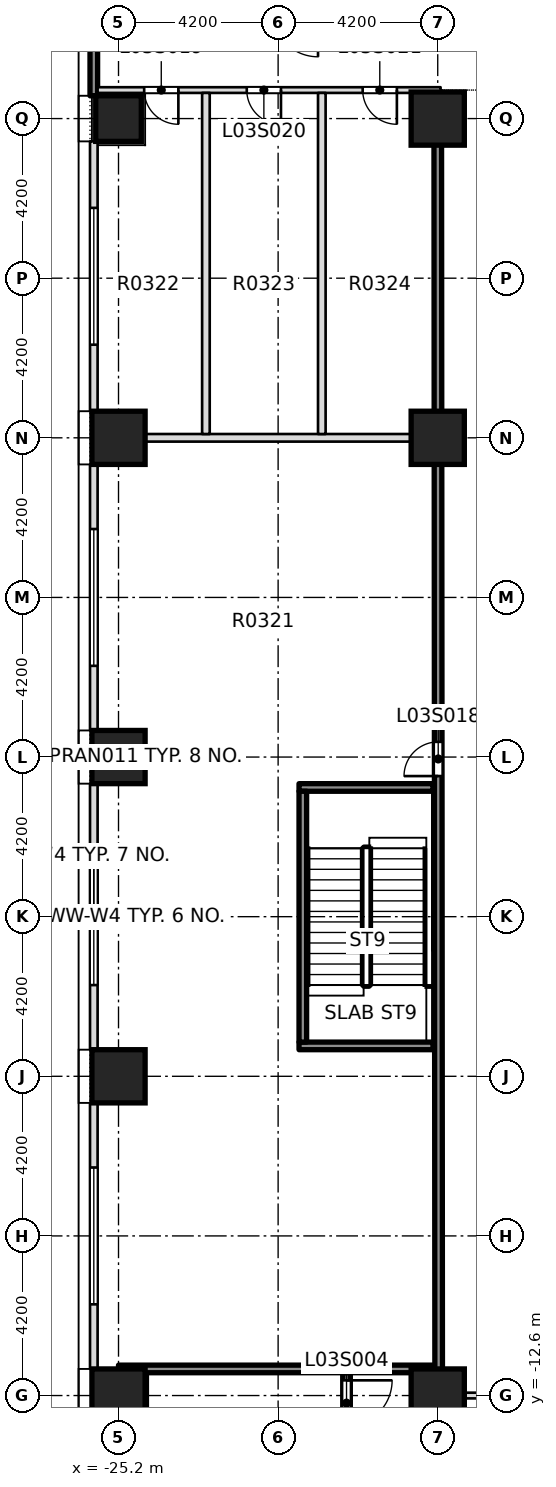
"""IFC4 building model, lengths in metres.
Left out: names, types, materials, properties, quantities, classifications, styles, units other than length and angle.
Written with IfcOpenShell. Run it as: python <this file> out.ifc"""

import sys

from ifc_helpers import new_model, si_unit, direction, frame, frame_2d, origin, origin_2d, place, context, subcontext, project, spatial, rectangle, extrude, element, fill, save


model = new_model("IFC4")
c1 = context("Model", 3, precision=1e-05, world=origin(), true_north=direction((0.0, 1.0)))
c2 = subcontext(c1, "Body", "Model", "MODEL_VIEW")
j1 = project(units=[si_unit("LENGTHUNIT", "METRE"), si_unit("PLANEANGLEUNIT", "RADIAN")], contexts=[c1])
p1 = place(None, origin())
s1 = spatial("IfcSite", under=j1, at=p1, CompositionType="ELEMENT")
p2 = place(p1, origin())
s2 = spatial("IfcBuilding", under=s1, at=p2, CompositionType="ELEMENT")
p3 = place(p2, frame((0.0, 0.0, 20.0)))
s3 = spatial("IfcBuildingStorey", under=s2, at=p3, CompositionType="ELEMENT", Elevation=20.0)
for number, where, z_axis, x_axis in (
    (1, (-25.2, -12.6, -0.4), (0.0, 0.0, 1.0), (1.0, 0.0, 0.0)),
    (2, (-16.8, -12.6, -0.4), (0.0, 0.0, 1.0), (1.0, 0.0, 0.0)),
    (3, (-25.2, -4.2, -0.4), (0.0, 0.0, 1.0), (1.0, 0.0, 0.0)),
    (4, (-25.2, 4.2, -0.4), (0.0, 0.0, 1.0), (1.0, 0.0, 0.0)),
    (5, (-25.2, 12.6, -0.4), (0.0, 0.0, 1.0), (1.0, 0.0, 0.0)),
    (6, (-16.8, 12.6, -0.4), (0.0, 0.0, 1.0), (1.0, 0.0, 0.0)),
    (7, (-16.8, 21.0, -0.4), (0.0, 0.0, 1.0), (1.0, 0.0, 0.0)),
):
    element("IfcColumn", number, at=place(p3, frame(where, z_axis=z_axis, x_axis=x_axis)), inside=s3, PredefinedType="COLUMN", context=c2, shape_type="SweptSolid", body=[
        extrude(rectangle(XDim=1.4, YDim=1.4, at=origin_2d()), origin(), (0.0, 0.0, 1.0), 5.0),
    ])
p4 = place(p3, frame((-25.2, 21.0, 0.0), z_axis=(0.0, 0.0, 1.0), x_axis=(1.0, 0.0, 0.0)))
e8 = element("IfcColumn", 8, at=p4, inside=s3, PredefinedType="COLUMN", context=c2, shape_type="SweptSolid", body=[
    extrude(rectangle(XDim=1.2, YDim=1.2, at=origin_2d()), origin(), (0.0, 0.0, 1.0), 5.0),
])
p5 = place(p3, frame((-16.9, -12.6, 0.0), z_axis=(0.0, 0.0, 1.0), x_axis=(1.0, 0.0, 0.0)))
e9 = element("IfcWall", 9, at=p5, inside=s3, PredefinedType="PARTITIONING", context=c2, shape_type="SweptSolid", body=[
    extrude(rectangle(XDim=9.625, YDim=0.15, at=frame_2d((4.812, 0.0))), origin(), (0.0, 0.0, 1.0), 4.6),
])
p6 = place(p3, frame((-25.2, -11.9, 0.0), z_axis=(0.0, 0.0, 1.0), x_axis=(1.0, 0.0, 0.0)))
e10 = element("IfcWall", 10, at=p6, inside=s3, PredefinedType="SOLIDWALL", context=c2, shape_type="SweptSolid", body=[
    extrude(rectangle(XDim=8.325, YDim=0.2, at=frame_2d((4.163, 0.0))), origin(), (0.0, 0.0, 1.0), 4.6),
])
p7 = place(p3, frame((-25.75, 12.6, 0.0), z_axis=(0.0, 0.0, 1.0), x_axis=(1.0, 0.0, 0.0)))
e11 = element("IfcWall", 11, at=p7, inside=s3, PredefinedType="PARTITIONING", context=c2, shape_type="SweptSolid", body=[
    extrude(rectangle(XDim=8.875, YDim=0.2, at=frame_2d((4.438, 0.0))), origin(), (0.0, 0.0, 1.0), 4.6),
])
p8 = place(p3, frame((-25.75, 21.75, 0.0), z_axis=(0.0, 0.0, 1.0), x_axis=(1.0, 0.0, 0.0)))
e12 = element("IfcWall", 12, at=p8, inside=s3, PredefinedType="PARTITIONING", context=c2, shape_type="SweptSolid", body=[
    extrude(rectangle(XDim=9.025, YDim=0.15, at=frame_2d((4.512, 0.0))), origin(), (0.0, 0.0, 1.0), 4.6),
])
p9 = place(p8, frame((1.225, 0.0, 0.0)))
e13 = element("IfcOpeningElement", 13, at=p9, cuts=e12, PredefinedType="OPENING", context=c2, shape_type="SweptSolid", body=[
    extrude(rectangle(XDim=0.9, YDim=2.1, at=frame_2d((0.45, 1.05))), frame((0.0, 0.085, 0.0), z_axis=(0.0, -1.0, 0.0), x_axis=(1.0, 0.0, 0.0)), (0.0, 0.0, 1.0), 0.17),
])
p10 = place(p8, frame((3.925, 0.0, 0.0)))
e14 = element("IfcOpeningElement", 14, at=p10, cuts=e12, PredefinedType="OPENING", context=c2, shape_type="SweptSolid", body=[
    extrude(rectangle(XDim=0.9, YDim=2.1, at=frame_2d((0.45, 1.05))), frame((0.0, 0.085, 0.0), z_axis=(0.0, -1.0, 0.0), x_axis=(1.0, 0.0, 0.0)), (0.0, 0.0, 1.0), 0.17),
])
p11 = place(p8, frame((6.975, 0.0, 0.0)))
e15 = element("IfcOpeningElement", 15, at=p11, cuts=e12, PredefinedType="OPENING", context=c2, shape_type="SweptSolid", body=[
    extrude(rectangle(XDim=0.9, YDim=2.1, at=frame_2d((0.45, 1.05))), frame((0.0, 0.085, 0.0), z_axis=(0.0, -1.0, 0.0), x_axis=(1.0, 0.0, 0.0)), (0.0, 0.0, 1.0), 0.17),
])
for number, where, z_axis, x_axis in (
    (16, (-22.9, 12.7, 0.0), (0.0, 0.0, 1.0), (0.0, 1.0, 0.0)),
    (17, (-19.85, 12.7, 0.0), (0.0, 0.0, 1.0), (0.0, 1.0, 0.0)),
):
    element("IfcWall", number, at=place(p3, frame(where, z_axis=z_axis, x_axis=x_axis)), inside=s3, PredefinedType="PARTITIONING", context=c2, shape_type="SweptSolid", body=[
        extrude(rectangle(XDim=8.975, YDim=0.2, at=frame_2d((4.488, 0.0))), origin(), (0.0, 0.0, 1.0), 4.6),
    ])
p12 = place(p3, frame((-19.2, -18.125, 0.0), z_axis=(0.0, 0.0, 1.0), x_axis=(0.0, 1.0, 0.0)))
e18 = element("IfcWall", 18, at=p12, inside=s3, PredefinedType="SOLIDWALL", context=c2, shape_type="SweptSolid", body=[
    extrude(rectangle(XDim=6.125, YDim=0.2, at=frame_2d((3.062, 0.0))), origin(), (0.0, 0.0, 1.0), 4.6),
])
p13 = place(p12, frame((4.725, 0.0, 0.0)))
e19 = element("IfcOpeningElement", 19, at=p13, cuts=e18, PredefinedType="OPENING", context=c2, shape_type="SweptSolid", body=[
    extrude(rectangle(XDim=1.2, YDim=2.1, at=frame_2d((0.6, 1.05))), frame((0.0, 0.11, 0.0), z_axis=(0.0, -1.0, 0.0), x_axis=(1.0, 0.0, 0.0)), (0.0, 0.0, 1.0), 0.22),
])
p14 = place(p3, frame((-16.8, -18.125, 0.0), z_axis=(0.0, 0.0, 1.0), x_axis=(0.0, 1.0, 0.0)))
e20 = element("IfcWall", 20, at=p14, inside=s3, PredefinedType="PARTITIONING", context=c2, shape_type="SweptSolid", body=[
    extrude(rectangle(XDim=5.45, YDim=0.2, at=frame_2d((2.725, 0.0))), origin(), (0.0, 0.0, 1.0), 4.6),
])
p15 = place(p3, frame((-16.775, -12.525, 0.0), z_axis=(0.0, 0.0, 1.0), x_axis=(-0.000727609751, 0.999999735292, 0.0)))
e21 = element("IfcWall", 21, at=p15, inside=s3, PredefinedType="SOLIDWALL", context=c2, shape_type="SweptSolid", body=[
    extrude(rectangle(XDim=34.225, YDim=0.2, at=frame_2d((17.112, 0.0))), origin(), (0.0, 0.0, 1.0), 4.6),
])
p16 = place(p15, frame((16.225, 0.0, 0.0)))
e22 = element("IfcOpeningElement", 22, at=p16, cuts=e21, PredefinedType="OPENING", context=c2, shape_type="SweptSolid", body=[
    extrude(rectangle(XDim=0.9, YDim=2.1, at=frame_2d((0.45, 1.05))), frame((0.0, 0.11, 0.0), z_axis=(0.0, -1.0, 0.0), x_axis=(1.0, 0.0, 0.0)), (0.0, 0.0, 1.0), 0.22),
])
p17 = place(p3, frame((-25.85, 21.6, 0.0), z_axis=(0.0, 0.0, 1.0), x_axis=(0.0, 1.0, 0.0)))
e23 = element("IfcWall", 23, at=p17, inside=s3, PredefinedType="SOLIDWALL", context=c2, shape_type="SweptSolid", body=[
    extrude(rectangle(XDim=7.2, YDim=0.2, at=frame_2d((3.6, 0.0))), origin(), (0.0, 0.0, 1.0), 4.6),
])
p18 = place(p17, frame((2.47, 0.0, 0.9)))
e24 = element("IfcOpeningElement", 24, at=p18, cuts=e23, PredefinedType="OPENING", context=c2, shape_type="SweptSolid", body=[
    extrude(rectangle(XDim=3.6, YDim=2.8, at=frame_2d((1.8, 1.4))), frame((0.0, 0.11, 0.0), z_axis=(0.0, -1.0, 0.0), x_axis=(1.0, 0.0, 0.0)), (0.0, 0.0, 1.0), 0.22),
])
p19 = place(p3, frame((-25.85, 20.4, 0.0), z_axis=(0.0, 0.0, 1.0), x_axis=(0.0, -1.0, 0.0)))
e25 = element("IfcWall", 25, at=p19, inside=s3, PredefinedType="STANDARD", context=c2, shape_type="SweptSolid", body=[
    extrude(rectangle(XDim=7.1, YDim=0.2, at=frame_2d((3.55, 0.0))), origin(), (0.0, 0.0, 1.0), 4.6),
])
p20 = place(p19, frame((1.75, 0.0, 0.9)))
e26 = element("IfcOpeningElement", 26, at=p20, cuts=e25, PredefinedType="OPENING", context=c2, shape_type="SweptSolid", body=[
    extrude(rectangle(XDim=3.6, YDim=2.8, at=frame_2d((1.8, 1.4))), frame((0.0, 0.11, 0.0), z_axis=(0.0, -1.0, 0.0), x_axis=(1.0, 0.0, 0.0)), (0.0, 0.0, 1.0), 0.22),
])
p21 = place(p3, frame((-25.85, 11.9, 0.0), z_axis=(0.0, 0.0, 1.0), x_axis=(0.0, -1.0, 0.0)))
e27 = element("IfcWall", 27, at=p21, inside=s3, PredefinedType="STANDARD", context=c2, shape_type="SweptSolid", body=[
    extrude(rectangle(XDim=7.0, YDim=0.2, at=frame_2d((3.5, 0.0))), origin(), (0.0, 0.0, 1.0), 4.6),
])
p22 = place(p21, frame((1.7, 0.0, 0.9)))
e28 = element("IfcOpeningElement", 28, at=p22, cuts=e27, PredefinedType="OPENING", context=c2, shape_type="SweptSolid", body=[
    extrude(rectangle(XDim=3.6, YDim=2.8, at=frame_2d((1.8, 1.4))), frame((0.0, 0.11, 0.0), z_axis=(0.0, -1.0, 0.0), x_axis=(1.0, 0.0, 0.0)), (0.0, 0.0, 1.0), 0.22),
])
p23 = place(p3, frame((-25.85, 3.5, 0.0), z_axis=(0.0, 0.0, 1.0), x_axis=(0.0, -1.0, 0.0)))
e29 = element("IfcWall", 29, at=p23, inside=s3, PredefinedType="STANDARD", context=c2, shape_type="SweptSolid", body=[
    extrude(rectangle(XDim=7.0, YDim=0.2, at=frame_2d((3.5, 0.0))), origin(), (0.0, 0.0, 1.0), 4.6),
])
p24 = place(p23, frame((1.7, 0.0, 0.9)))
e30 = element("IfcOpeningElement", 30, at=p24, cuts=e29, PredefinedType="OPENING", context=c2, shape_type="SweptSolid", body=[
    extrude(rectangle(XDim=3.6, YDim=2.8, at=frame_2d((1.8, 1.4))), frame((0.0, 0.11, 0.0), z_axis=(0.0, -1.0, 0.0), x_axis=(1.0, 0.0, 0.0)), (0.0, 0.0, 1.0), 0.22),
])
p25 = place(p3, frame((-25.85, -4.9, 0.0), z_axis=(0.0, 0.0, 1.0), x_axis=(0.0, -1.0, 0.0)))
e31 = element("IfcWall", 31, at=p25, inside=s3, PredefinedType="STANDARD", context=c2, shape_type="SweptSolid", body=[
    extrude(rectangle(XDim=7.0, YDim=0.2, at=frame_2d((3.5, 0.0))), origin(), (0.0, 0.0, 1.0), 4.6),
])
p26 = place(p25, frame((1.7, 0.0, 0.9)))
e32 = element("IfcOpeningElement", 32, at=p26, cuts=e31, PredefinedType="OPENING", context=c2, shape_type="SweptSolid", body=[
    extrude(rectangle(XDim=3.6, YDim=2.8, at=frame_2d((1.8, 1.4))), frame((0.0, 0.11, 0.0), z_axis=(0.0, -1.0, 0.0), x_axis=(1.0, 0.0, 0.0)), (0.0, 0.0, 1.0), 0.22),
])
for number, where, z_axis, x_axis in (
    (33, (-20.45, -3.4, 0.0), (0.0, 0.0, 1.0), (1.0, 0.0, 0.0)),
    (34, (-20.45, 3.4, 0.0), (0.0, 0.0, 1.0), (1.0, 0.0, 0.0)),
):
    element("IfcWall", number, at=place(p3, frame(where, z_axis=z_axis, x_axis=x_axis)), inside=s3, PredefinedType="SOLIDWALL", context=c2, shape_type="SweptSolid", body=[
        extrude(rectangle(XDim=3.525, YDim=0.2, at=frame_2d((1.762, 0.0))), origin(), (0.0, 0.0, 1.0), 4.6),
    ])
p27 = place(p3, frame((-20.35, -3.3, 0.0), z_axis=(0.0, 0.0, 1.0), x_axis=(0.0, 1.0, 0.0)))
e35 = element("IfcWall", 35, at=p27, inside=s3, PredefinedType="SOLIDWALL", context=c2, shape_type="SweptSolid", body=[
    extrude(rectangle(XDim=6.6, YDim=0.2, at=frame_2d((3.3, 0.0))), origin(), (0.0, 0.0, 1.0), 4.6),
])
p28 = place(p13, origin())
e36 = element("IfcDoor", 36, at=p28, inside=s3, OperationType="DOUBLE_DOOR_SINGLE_SWING", PredefinedType="DOOR", context=c2, shape_type="SweptSolid", body=[
    extrude(rectangle(XDim=1.2, YDim=2.1, at=frame_2d((0.6, 1.05))), frame((0.0, 0.025, 0.0), z_axis=(0.0, -1.0, 0.0), x_axis=(1.0, 0.0, 0.0)), (0.0, 0.0, 1.0), 0.05),
])
fill(e19, e36)
p29 = place(p16, origin())
e37 = element("IfcDoor", 37, at=p29, inside=s3, OperationType="SINGLE_SWING_LEFT", PredefinedType="DOOR", context=c2, shape_type="SweptSolid", body=[
    extrude(rectangle(XDim=0.9, YDim=2.1, at=frame_2d((0.45, 1.05))), frame((0.0, 0.025, 0.0), z_axis=(0.0, -1.0, 0.0), x_axis=(1.0, 0.0, 0.0)), (0.0, 0.0, 1.0), 0.05),
])
fill(e22, e37)
p30 = place(p9, origin())
e38 = element("IfcDoor", 38, at=p30, inside=s3, OperationType="SINGLE_SWING_RIGHT", PredefinedType="DOOR", context=c2, shape_type="SweptSolid", body=[
    extrude(rectangle(XDim=0.9, YDim=2.1, at=frame_2d((0.45, 1.05))), frame((0.0, 0.025, 0.0), z_axis=(0.0, -1.0, 0.0), x_axis=(1.0, 0.0, 0.0)), (0.0, 0.0, 1.0), 0.05),
])
fill(e13, e38)
p31 = place(p10, origin())
e39 = element("IfcDoor", 39, at=p31, inside=s3, OperationType="SINGLE_SWING_RIGHT", PredefinedType="DOOR", context=c2, shape_type="SweptSolid", body=[
    extrude(rectangle(XDim=0.9, YDim=2.1, at=frame_2d((0.45, 1.05))), frame((0.0, 0.025, 0.0), z_axis=(0.0, -1.0, 0.0), x_axis=(1.0, 0.0, 0.0)), (0.0, 0.0, 1.0), 0.05),
])
fill(e14, e39)
p32 = place(p11, origin())
e40 = element("IfcDoor", 40, at=p32, inside=s3, OperationType="SINGLE_SWING_RIGHT", PredefinedType="DOOR", context=c2, shape_type="SweptSolid", body=[
    extrude(rectangle(XDim=0.9, YDim=2.1, at=frame_2d((0.45, 1.05))), frame((0.0, 0.025, 0.0), z_axis=(0.0, -1.0, 0.0), x_axis=(1.0, 0.0, 0.0)), (0.0, 0.0, 1.0), 0.05),
])
fill(e15, e40)
p33 = place(p20, origin())
e41 = element("IfcWindow", 41, at=p33, inside=s3, PartitioningType="SINGLE_PANEL", PredefinedType="WINDOW", context=c2, shape_type="SweptSolid", body=[
    extrude(rectangle(XDim=3.6, YDim=2.8, at=frame_2d((1.8, 1.4))), frame((0.0, 0.03, 0.0), z_axis=(0.0, -1.0, 0.0), x_axis=(1.0, 0.0, 0.0)), (0.0, 0.0, 1.0), 0.06),
])
fill(e26, e41)
p34 = place(p22, origin())
e42 = element("IfcWindow", 42, at=p34, inside=s3, PartitioningType="SINGLE_PANEL", PredefinedType="WINDOW", context=c2, shape_type="SweptSolid", body=[
    extrude(rectangle(XDim=3.6, YDim=2.8, at=frame_2d((1.8, 1.4))), frame((0.0, 0.03, 0.0), z_axis=(0.0, -1.0, 0.0), x_axis=(1.0, 0.0, 0.0)), (0.0, 0.0, 1.0), 0.06),
])
fill(e28, e42)
p35 = place(p24, origin())
e43 = element("IfcWindow", 43, at=p35, inside=s3, PartitioningType="SINGLE_PANEL", PredefinedType="WINDOW", context=c2, shape_type="SweptSolid", body=[
    extrude(rectangle(XDim=3.6, YDim=2.8, at=frame_2d((1.8, 1.4))), frame((0.0, 0.03, 0.0), z_axis=(0.0, -1.0, 0.0), x_axis=(1.0, 0.0, 0.0)), (0.0, 0.0, 1.0), 0.06),
])
fill(e30, e43)
p36 = place(p26, origin())
e44 = element("IfcWindow", 44, at=p36, inside=s3, PartitioningType="SINGLE_PANEL", PredefinedType="WINDOW", context=c2, shape_type="SweptSolid", body=[
    extrude(rectangle(XDim=3.6, YDim=2.8, at=frame_2d((1.8, 1.4))), frame((0.0, 0.03, 0.0), z_axis=(0.0, -1.0, 0.0), x_axis=(1.0, 0.0, 0.0)), (0.0, 0.0, 1.0), 0.06),
])
fill(e32, e44)
save(model, sys.argv[1])
